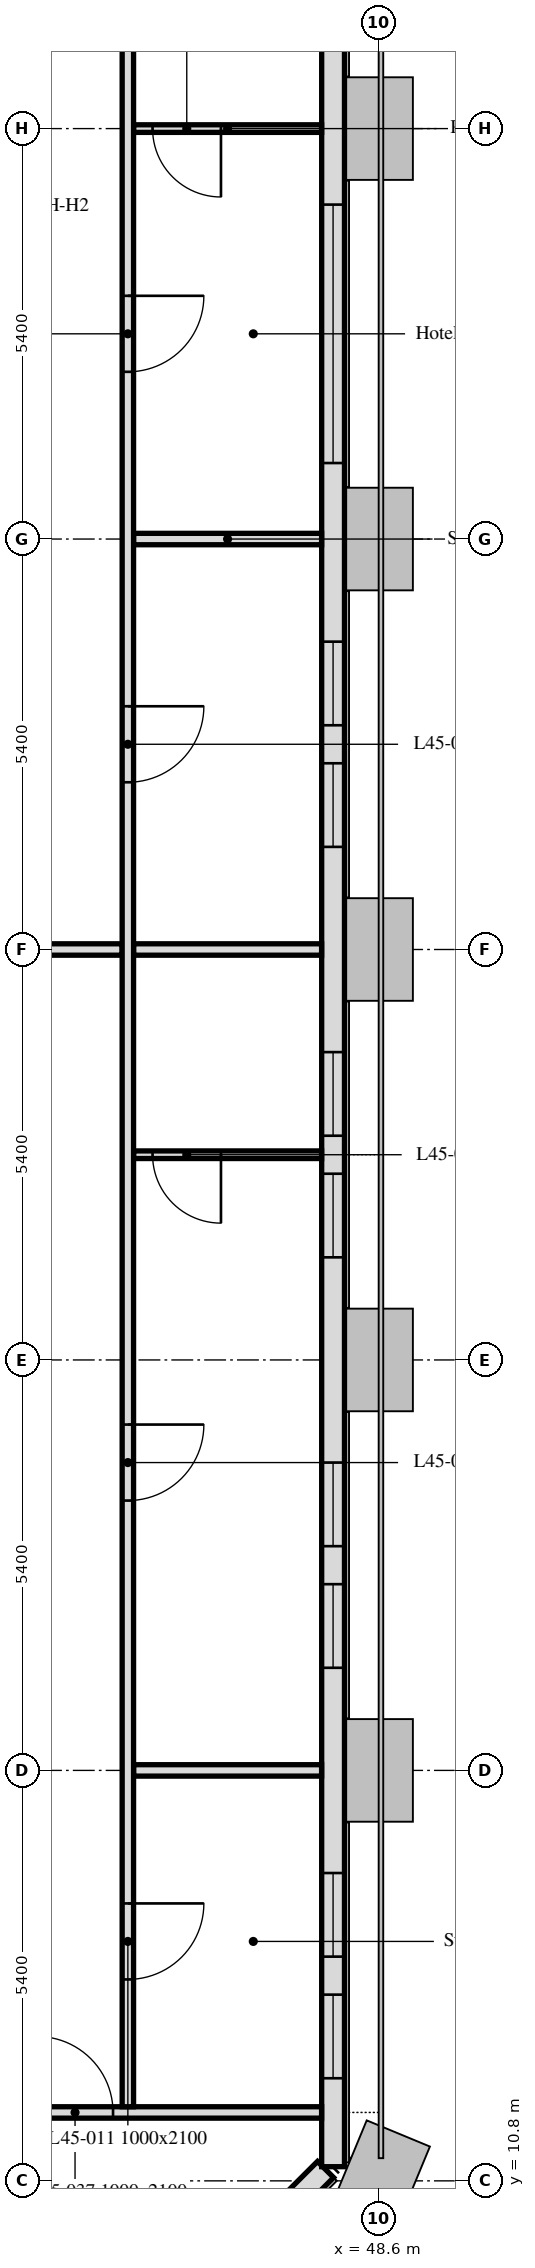
"""IFC4 building model, lengths in metres.
Left out: names, types, materials, properties, quantities, classifications, styles, units other than length and angle.
Written with IfcOpenShell. Run it as: python <this file> out.ifc"""

import sys

from ifc_helpers import new_model, si_unit, direction, frame, frame_2d, origin, place, context, subcontext, project, spatial, rectangle, extrude, element, fill, save


model = new_model("IFC4")
c1 = context("Model", 3, precision=1e-05, world=origin(), true_north=direction((0.0, 1.0)))
c2 = subcontext(c1, "Body", "Model", "MODEL_VIEW")
j1 = project(units=[si_unit("LENGTHUNIT", "METRE"), si_unit("PLANEANGLEUNIT", "RADIAN")], contexts=[c1])
p1 = place(None, origin())
s1 = spatial("IfcSite", under=j1, at=p1, CompositionType="ELEMENT")
p2 = place(p1, origin())
s2 = spatial("IfcBuilding", under=s1, at=p2, CompositionType="ELEMENT")
p3 = place(p2, frame((0.0, 0.0, 187.3)))
s3 = spatial("IfcBuildingStorey", under=s2, at=p3, CompositionType="ELEMENT", Elevation=187.3)
p4 = place(p3, frame((43.051, 6.099, 0.0), z_axis=(0.0, 0.0, 1.0), x_axis=(0.707106781187, 0.707106781187, 0.0)))
e1 = element("IfcWall", 1, at=p4, inside=s3, PredefinedType="SOLIDWALL", context=c2, shape_type="SweptSolid", body=[
    extrude(rectangle(XDim=6.86, YDim=0.3, at=frame_2d((3.43, 0.0))), origin(), (0.0, 0.0, 1.0), 3.0),
])
p5 = place(p4, frame((1.73, 0.0, 0.9)))
e2 = element("IfcOpeningElement", 2, at=p5, cuts=e1, PredefinedType="OPENING", context=c2, shape_type="SweptSolid", body=[
    extrude(rectangle(XDim=3.4, YDim=1.7, at=frame_2d((1.7, 0.85))), frame((0.0, 0.16, 0.0), z_axis=(0.0, -1.0, 0.0), x_axis=(1.0, 0.0, 0.0)), (0.0, 0.0, 1.0), 0.32),
])
p6 = place(p3, frame((48.0, 10.986, 0.0), z_axis=(0.0, 0.0, 1.0), x_axis=(0.0, 1.0, 0.0)))
e3 = element("IfcWall", 3, at=p6, inside=s3, PredefinedType="SOLIDWALL", context=c2, shape_type="SweptSolid", body=[
    extrude(rectangle(XDim=32.027, YDim=0.3, at=frame_2d((16.014, 0.0))), origin(), (0.0, 0.0, 1.0), 3.0),
])
p7 = place(p6, frame((1.164, 0.0, 0.9)))
e4 = element("IfcOpeningElement", 4, at=p7, cuts=e3, PredefinedType="OPENING", context=c2, shape_type="SweptSolid", body=[
    extrude(rectangle(XDim=1.1, YDim=1.7, at=frame_2d((0.55, 0.85))), frame((0.0, 0.16, 0.0), z_axis=(0.0, -1.0, 0.0), x_axis=(1.0, 0.0, 0.0)), (0.0, 0.0, 1.0), 0.32),
])
p8 = place(p6, frame((2.764, 0.0, 0.9)))
e5 = element("IfcOpeningElement", 5, at=p8, cuts=e3, PredefinedType="OPENING", context=c2, shape_type="SweptSolid", body=[
    extrude(rectangle(XDim=1.1, YDim=1.7, at=frame_2d((0.55, 0.85))), frame((0.0, 0.16, 0.0), z_axis=(0.0, -1.0, 0.0), x_axis=(1.0, 0.0, 0.0)), (0.0, 0.0, 1.0), 0.32),
])
p9 = place(p6, frame((6.564, 0.0, 0.9)))
e6 = element("IfcOpeningElement", 6, at=p9, cuts=e3, PredefinedType="OPENING", context=c2, shape_type="SweptSolid", body=[
    extrude(rectangle(XDim=1.1, YDim=1.7, at=frame_2d((0.55, 0.85))), frame((0.0, 0.16, 0.0), z_axis=(0.0, -1.0, 0.0), x_axis=(1.0, 0.0, 0.0)), (0.0, 0.0, 1.0), 0.32),
])
p10 = place(p6, frame((8.164, 0.0, 0.9)))
e7 = element("IfcOpeningElement", 7, at=p10, cuts=e3, PredefinedType="OPENING", context=c2, shape_type="SweptSolid", body=[
    extrude(rectangle(XDim=1.1, YDim=1.7, at=frame_2d((0.55, 0.85))), frame((0.0, 0.16, 0.0), z_axis=(0.0, -1.0, 0.0), x_axis=(1.0, 0.0, 0.0)), (0.0, 0.0, 1.0), 0.32),
])
p11 = place(p6, frame((11.964, 0.0, 0.9)))
e8 = element("IfcOpeningElement", 8, at=p11, cuts=e3, PredefinedType="OPENING", context=c2, shape_type="SweptSolid", body=[
    extrude(rectangle(XDim=1.1, YDim=1.7, at=frame_2d((0.55, 0.85))), frame((0.0, 0.16, 0.0), z_axis=(0.0, -1.0, 0.0), x_axis=(1.0, 0.0, 0.0)), (0.0, 0.0, 1.0), 0.32),
])
p12 = place(p6, frame((13.564, 0.0, 0.9)))
e9 = element("IfcOpeningElement", 9, at=p12, cuts=e3, PredefinedType="OPENING", context=c2, shape_type="SweptSolid", body=[
    extrude(rectangle(XDim=1.1, YDim=1.7, at=frame_2d((0.55, 0.85))), frame((0.0, 0.16, 0.0), z_axis=(0.0, -1.0, 0.0), x_axis=(1.0, 0.0, 0.0)), (0.0, 0.0, 1.0), 0.32),
])
p13 = place(p6, frame((17.364, 0.0, 0.9)))
e10 = element("IfcOpeningElement", 10, at=p13, cuts=e3, PredefinedType="OPENING", context=c2, shape_type="SweptSolid", body=[
    extrude(rectangle(XDim=1.1, YDim=1.7, at=frame_2d((0.55, 0.85))), frame((0.0, 0.16, 0.0), z_axis=(0.0, -1.0, 0.0), x_axis=(1.0, 0.0, 0.0)), (0.0, 0.0, 1.0), 0.32),
])
p14 = place(p6, frame((18.964, 0.0, 0.9)))
e11 = element("IfcOpeningElement", 11, at=p14, cuts=e3, PredefinedType="OPENING", context=c2, shape_type="SweptSolid", body=[
    extrude(rectangle(XDim=1.1, YDim=1.7, at=frame_2d((0.55, 0.85))), frame((0.0, 0.16, 0.0), z_axis=(0.0, -1.0, 0.0), x_axis=(1.0, 0.0, 0.0)), (0.0, 0.0, 1.0), 0.32),
])
p15 = place(p6, frame((22.414, 0.0, 0.9)))
e12 = element("IfcOpeningElement", 12, at=p15, cuts=e3, PredefinedType="OPENING", context=c2, shape_type="SweptSolid", body=[
    extrude(rectangle(XDim=3.4, YDim=1.7, at=frame_2d((1.7, 0.85))), frame((0.0, 0.16, 0.0), z_axis=(0.0, -1.0, 0.0), x_axis=(1.0, 0.0, 0.0)), (0.0, 0.0, 1.0), 0.32),
])
p16 = place(p6, frame((28.164, 0.0, 0.9)))
e13 = element("IfcOpeningElement", 13, at=p16, cuts=e3, PredefinedType="OPENING", context=c2, shape_type="SweptSolid", body=[
    extrude(rectangle(XDim=1.1, YDim=1.7, at=frame_2d((0.55, 0.85))), frame((0.0, 0.16, 0.0), z_axis=(0.0, -1.0, 0.0), x_axis=(1.0, 0.0, 0.0)), (0.0, 0.0, 1.0), 0.32),
])
p17 = place(p6, frame((29.764, 0.0, 0.9)))
e14 = element("IfcOpeningElement", 14, at=p17, cuts=e3, PredefinedType="OPENING", context=c2, shape_type="SweptSolid", body=[
    extrude(rectangle(XDim=1.1, YDim=1.7, at=frame_2d((0.55, 0.85))), frame((0.0, 0.16, 0.0), z_axis=(0.0, -1.0, 0.0), x_axis=(1.0, 0.0, 0.0)), (0.0, 0.0, 1.0), 0.32),
])
p18 = place(p3, frame((45.375, 32.4, 0.0), z_axis=(0.0, 0.0, 1.0), x_axis=(1.0, 0.0, 0.0)))
e15 = element("IfcWall", 15, at=p18, inside=s3, PredefinedType="PARTITIONING", context=c2, shape_type="SweptSolid", body=[
    extrude(rectangle(XDim=2.474, YDim=0.15, at=frame_2d((1.237, 0.0))), origin(), (0.0, 0.0, 1.0), 2.4),
])
p19 = place(p3, frame((47.849, 37.8, 0.0), z_axis=(0.0, 0.0, 1.0), x_axis=(-1.0, 0.0, 0.0)))
e16 = element("IfcWall", 16, at=p19, inside=s3, PredefinedType="PARTITIONING", context=c2, shape_type="SweptSolid", body=[
    extrude(rectangle(XDim=2.474, YDim=0.1, at=frame_2d((1.237, 0.0))), origin(), (0.0, 0.0, 1.0), 2.4),
])
p20 = place(p19, frame((1.324, 0.0, 0.0)))
e17 = element("IfcOpeningElement", 17, at=p20, cuts=e16, PredefinedType="OPENING", context=c2, shape_type="SweptSolid", body=[
    extrude(rectangle(XDim=0.9, YDim=2.1, at=frame_2d((0.45, 1.05))), frame((0.0, 0.05, 0.0), z_axis=(0.0, -1.0, 0.0), x_axis=(1.0, 0.0, 0.0)), (0.0, 0.0, 1.0), 0.1),
])
p21 = place(p3, frame((45.375, 27.0, 0.0), z_axis=(0.0, 0.0, 1.0), x_axis=(1.0, 0.0, 0.0)))
e18 = element("IfcWall", 18, at=p21, inside=s3, PredefinedType="PARTITIONING", context=c2, shape_type="SweptSolid", body=[
    extrude(rectangle(XDim=2.474, YDim=0.15, at=frame_2d((1.237, 0.0))), origin(), (0.0, 0.0, 1.0), 2.4),
])
p22 = place(p3, frame((43.2, 27.0, 0.0), z_axis=(0.0, 0.0, 1.0), x_axis=(1.0, 0.0, 0.0)))
e19 = element("IfcWall", 19, at=p22, inside=s3, PredefinedType="PARTITIONING", context=c2, shape_type="SweptSolid", body=[
    extrude(rectangle(XDim=2.025, YDim=0.15, at=frame_2d((1.013, 0.0))), origin(), (0.0, 0.0, 1.0), 2.4),
])
p23 = place(p3, frame((47.849, 16.2, 0.0), z_axis=(0.0, 0.0, 1.0), x_axis=(-1.0, 0.0, 0.0)))
e20 = element("IfcWall", 20, at=p23, inside=s3, PredefinedType="PARTITIONING", context=c2, shape_type="SweptSolid", body=[
    extrude(rectangle(XDim=2.474, YDim=0.15, at=frame_2d((1.237, 0.0))), origin(), (0.0, 0.0, 1.0), 2.4),
])
p24 = place(p3, frame((6.151, 11.7, 0.0), z_axis=(0.0, 0.0, 1.0), x_axis=(1.0, 0.0, 0.0)))
e21 = element("IfcWall", 21, at=p24, inside=s3, PredefinedType="PARTITIONING", context=c2, shape_type="SweptSolid", body=[
    extrude(rectangle(XDim=41.698, YDim=0.15, at=frame_2d((20.849, 0.0))), origin(), (0.0, 0.0, 1.0), 3.0),
])
p25 = place(p24, frame((1.449, 0.0, 0.0)))
e22 = element("IfcOpeningElement", 22, at=p25, cuts=e21, PredefinedType="OPENING", context=c2, shape_type="SweptSolid", body=[
    extrude(rectangle(XDim=1.0, YDim=2.1, at=frame_2d((0.5, 1.05))), frame((0.0, 0.075, 0.0), z_axis=(0.0, -1.0, 0.0), x_axis=(1.0, 0.0, 0.0)), (0.0, 0.0, 1.0), 0.15),
])
p26 = place(p24, frame((37.954, 0.0, 0.0)))
e23 = element("IfcOpeningElement", 23, at=p26, cuts=e21, PredefinedType="OPENING", context=c2, shape_type="SweptSolid", body=[
    extrude(rectangle(XDim=1.0, YDim=2.1, at=frame_2d((0.5, 1.05))), frame((0.0, 0.075, 0.0), z_axis=(0.0, -1.0, 0.0), x_axis=(1.0, 0.0, 0.0)), (0.0, 0.0, 1.0), 0.15),
])
p27 = place(p24, frame((12.449, 0.0, 0.0)))
e24 = element("IfcOpeningElement", 24, at=p27, cuts=e21, PredefinedType="OPENING", context=c2, shape_type="SweptSolid", body=[
    extrude(rectangle(XDim=1.0, YDim=2.1, at=frame_2d((0.5, 1.05))), frame((0.0, 0.075, 0.0), z_axis=(0.0, -1.0, 0.0), x_axis=(1.0, 0.0, 0.0)), (0.0, 0.0, 1.0), 0.15),
])
p28 = place(p24, frame((23.249, 0.0, 0.0)))
e25 = element("IfcOpeningElement", 25, at=p28, cuts=e21, PredefinedType="OPENING", context=c2, shape_type="SweptSolid", body=[
    extrude(rectangle(XDim=1.0, YDim=2.1, at=frame_2d((0.5, 1.05))), frame((0.0, 0.075, 0.0), z_axis=(0.0, -1.0, 0.0), x_axis=(1.0, 0.0, 0.0)), (0.0, 0.0, 1.0), 0.15),
])
p29 = place(p3, frame((47.849, 24.3, 0.0), z_axis=(0.0, 0.0, 1.0), x_axis=(-1.0, 0.0, 0.0)))
e26 = element("IfcWall", 26, at=p29, inside=s3, PredefinedType="PARTITIONING", context=c2, shape_type="SweptSolid", body=[
    extrude(rectangle(XDim=2.474, YDim=0.1, at=frame_2d((1.237, 0.0))), origin(), (0.0, 0.0, 1.0), 3.0),
])
p30 = place(p29, frame((1.324, 0.0, 0.0)))
e27 = element("IfcOpeningElement", 27, at=p30, cuts=e26, PredefinedType="OPENING", context=c2, shape_type="SweptSolid", body=[
    extrude(rectangle(XDim=0.9, YDim=2.1, at=frame_2d((0.45, 1.05))), frame((0.0, 0.05, 0.0), z_axis=(0.0, -1.0, 0.0), x_axis=(1.0, 0.0, 0.0)), (0.0, 0.0, 1.0), 0.1),
])
p31 = place(p3, frame((45.3, 40.425, 0.0), z_axis=(0.0, 0.0, 1.0), x_axis=(0.0, -1.0, 0.0)))
e28 = element("IfcWall", 28, at=p31, inside=s3, PredefinedType="PARTITIONING", context=c2, shape_type="SweptSolid", body=[
    extrude(rectangle(XDim=28.65, YDim=0.15, at=frame_2d((14.325, 0.0))), origin(), (0.0, 0.0, 1.0), 2.4),
])
p32 = place(p31, frame((10.225, 0.0, 0.0)))
e29 = element("IfcOpeningElement", 29, at=p32, cuts=e28, PredefinedType="OPENING", context=c2, shape_type="SweptSolid", body=[
    extrude(rectangle(XDim=1.0, YDim=2.1, at=frame_2d((0.5, 1.05))), frame((0.0, 0.075, 0.0), z_axis=(0.0, -1.0, 0.0), x_axis=(1.0, 0.0, 0.0)), (0.0, 0.0, 1.0), 0.15),
])
p33 = place(p31, frame((25.975, 0.0, 0.0)))
e30 = element("IfcOpeningElement", 30, at=p33, cuts=e28, PredefinedType="OPENING", context=c2, shape_type="SweptSolid", body=[
    extrude(rectangle(XDim=1.0, YDim=2.1, at=frame_2d((0.5, 1.05))), frame((0.0, 0.075, 0.0), z_axis=(0.0, -1.0, 0.0), x_axis=(1.0, 0.0, 0.0)), (0.0, 0.0, 1.0), 0.15),
])
p34 = place(p31, frame((4.825, 0.0, 0.0)))
e31 = element("IfcOpeningElement", 31, at=p34, cuts=e28, PredefinedType="OPENING", context=c2, shape_type="SweptSolid", body=[
    extrude(rectangle(XDim=1.0, YDim=2.1, at=frame_2d((0.5, 1.05))), frame((0.0, 0.075, 0.0), z_axis=(0.0, -1.0, 0.0), x_axis=(1.0, 0.0, 0.0)), (0.0, 0.0, 1.0), 0.15),
])
p35 = place(p31, frame((19.675, 0.0, 0.0)))
e32 = element("IfcOpeningElement", 32, at=p35, cuts=e28, PredefinedType="OPENING", context=c2, shape_type="SweptSolid", body=[
    extrude(rectangle(XDim=1.0, YDim=2.1, at=frame_2d((0.5, 1.05))), frame((0.0, 0.075, 0.0), z_axis=(0.0, -1.0, 0.0), x_axis=(1.0, 0.0, 0.0)), (0.0, 0.0, 1.0), 0.15),
])
p36 = place(p7, origin())
e33 = element("IfcWindow", 33, at=p36, inside=s3, PartitioningType="SINGLE_PANEL", PredefinedType="WINDOW", context=c2, shape_type="SweptSolid", body=[
    extrude(rectangle(XDim=1.1, YDim=1.7, at=frame_2d((0.55, 0.85))), frame((0.0, 0.03, 0.0), z_axis=(0.0, -1.0, 0.0), x_axis=(1.0, 0.0, 0.0)), (0.0, 0.0, 1.0), 0.06),
])
fill(e4, e33)
p37 = place(p8, origin())
e34 = element("IfcWindow", 34, at=p37, inside=s3, PartitioningType="SINGLE_PANEL", PredefinedType="WINDOW", context=c2, shape_type="SweptSolid", body=[
    extrude(rectangle(XDim=1.1, YDim=1.7, at=frame_2d((0.55, 0.85))), frame((0.0, 0.03, 0.0), z_axis=(0.0, -1.0, 0.0), x_axis=(1.0, 0.0, 0.0)), (0.0, 0.0, 1.0), 0.06),
])
fill(e5, e34)
p38 = place(p9, origin())
e35 = element("IfcWindow", 35, at=p38, inside=s3, PartitioningType="SINGLE_PANEL", PredefinedType="WINDOW", context=c2, shape_type="SweptSolid", body=[
    extrude(rectangle(XDim=1.1, YDim=1.7, at=frame_2d((0.55, 0.85))), frame((0.0, 0.03, 0.0), z_axis=(0.0, -1.0, 0.0), x_axis=(1.0, 0.0, 0.0)), (0.0, 0.0, 1.0), 0.06),
])
fill(e6, e35)
p39 = place(p10, origin())
e36 = element("IfcWindow", 36, at=p39, inside=s3, PartitioningType="SINGLE_PANEL", PredefinedType="WINDOW", context=c2, shape_type="SweptSolid", body=[
    extrude(rectangle(XDim=1.1, YDim=1.7, at=frame_2d((0.55, 0.85))), frame((0.0, 0.03, 0.0), z_axis=(0.0, -1.0, 0.0), x_axis=(1.0, 0.0, 0.0)), (0.0, 0.0, 1.0), 0.06),
])
fill(e7, e36)
p40 = place(p11, origin())
e37 = element("IfcWindow", 37, at=p40, inside=s3, PartitioningType="SINGLE_PANEL", PredefinedType="WINDOW", context=c2, shape_type="SweptSolid", body=[
    extrude(rectangle(XDim=1.1, YDim=1.7, at=frame_2d((0.55, 0.85))), frame((0.0, 0.03, 0.0), z_axis=(0.0, -1.0, 0.0), x_axis=(1.0, 0.0, 0.0)), (0.0, 0.0, 1.0), 0.06),
])
fill(e8, e37)
p41 = place(p12, origin())
e38 = element("IfcWindow", 38, at=p41, inside=s3, PartitioningType="SINGLE_PANEL", PredefinedType="WINDOW", context=c2, shape_type="SweptSolid", body=[
    extrude(rectangle(XDim=1.1, YDim=1.7, at=frame_2d((0.55, 0.85))), frame((0.0, 0.03, 0.0), z_axis=(0.0, -1.0, 0.0), x_axis=(1.0, 0.0, 0.0)), (0.0, 0.0, 1.0), 0.06),
])
fill(e9, e38)
p42 = place(p13, origin())
e39 = element("IfcWindow", 39, at=p42, inside=s3, PartitioningType="SINGLE_PANEL", PredefinedType="WINDOW", context=c2, shape_type="SweptSolid", body=[
    extrude(rectangle(XDim=1.1, YDim=1.7, at=frame_2d((0.55, 0.85))), frame((0.0, 0.03, 0.0), z_axis=(0.0, -1.0, 0.0), x_axis=(1.0, 0.0, 0.0)), (0.0, 0.0, 1.0), 0.06),
])
fill(e10, e39)
p43 = place(p14, origin())
e40 = element("IfcWindow", 40, at=p43, inside=s3, PartitioningType="SINGLE_PANEL", PredefinedType="WINDOW", context=c2, shape_type="SweptSolid", body=[
    extrude(rectangle(XDim=1.1, YDim=1.7, at=frame_2d((0.55, 0.85))), frame((0.0, 0.03, 0.0), z_axis=(0.0, -1.0, 0.0), x_axis=(1.0, 0.0, 0.0)), (0.0, 0.0, 1.0), 0.06),
])
fill(e11, e40)
p44 = place(p15, origin())
e41 = element("IfcWindow", 41, at=p44, inside=s3, PartitioningType="SINGLE_PANEL", PredefinedType="WINDOW", context=c2, shape_type="SweptSolid", body=[
    extrude(rectangle(XDim=3.4, YDim=1.7, at=frame_2d((1.7, 0.85))), frame((0.0, 0.03, 0.0), z_axis=(0.0, -1.0, 0.0), x_axis=(1.0, 0.0, 0.0)), (0.0, 0.0, 1.0), 0.06),
])
fill(e12, e41)
p45 = place(p20, origin())
e42 = element("IfcDoor", 42, at=p45, inside=s3, OperationType="SINGLE_SWING_RIGHT", PredefinedType="DOOR", context=c2, shape_type="SweptSolid", body=[
    extrude(rectangle(XDim=0.9, YDim=2.1, at=frame_2d((0.45, 1.05))), frame((0.0, 0.025, 0.0), z_axis=(0.0, -1.0, 0.0), x_axis=(1.0, 0.0, 0.0)), (0.0, 0.0, 1.0), 0.05),
])
fill(e17, e42)
p46 = place(p32, origin())
e43 = element("IfcDoor", 43, at=p46, inside=s3, OperationType="SINGLE_SWING_RIGHT", PredefinedType="DOOR", context=c2, shape_type="SweptSolid", body=[
    extrude(rectangle(XDim=1.0, YDim=2.1, at=frame_2d((0.5, 1.05))), frame((0.0, 0.025, 0.0), z_axis=(0.0, -1.0, 0.0), x_axis=(1.0, 0.0, 0.0)), (0.0, 0.0, 1.0), 0.05),
])
fill(e29, e43)
p47 = place(p33, origin())
e44 = element("IfcDoor", 44, at=p47, inside=s3, OperationType="SINGLE_SWING_LEFT", PredefinedType="DOOR", context=c2, shape_type="SweptSolid", body=[
    extrude(rectangle(XDim=1.0, YDim=2.1, at=frame_2d((0.5, 1.05))), frame((0.0, 0.025, 0.0), z_axis=(0.0, -1.0, 0.0), x_axis=(1.0, 0.0, 0.0)), (0.0, 0.0, 1.0), 0.05),
])
fill(e30, e44)
p48 = place(p30, origin())
e45 = element("IfcDoor", 45, at=p48, inside=s3, OperationType="SINGLE_SWING_LEFT", PredefinedType="DOOR", context=c2, shape_type="SweptSolid", body=[
    extrude(rectangle(XDim=0.9, YDim=2.1, at=frame_2d((0.45, 1.05))), frame((0.0, 0.025, 0.0), z_axis=(0.0, -1.0, 0.0), x_axis=(1.0, 0.0, 0.0)), (0.0, 0.0, 1.0), 0.05),
])
fill(e27, e45)
p49 = place(p34, origin())
e46 = element("IfcDoor", 46, at=p49, inside=s3, OperationType="SINGLE_SWING_RIGHT", PredefinedType="DOOR", context=c2, shape_type="SweptSolid", body=[
    extrude(rectangle(XDim=1.0, YDim=2.1, at=frame_2d((0.5, 1.05))), frame((0.0, 0.025, 0.0), z_axis=(0.0, -1.0, 0.0), x_axis=(1.0, 0.0, 0.0)), (0.0, 0.0, 1.0), 0.05),
])
fill(e31, e46)
p50 = place(p26, origin())
e47 = element("IfcDoor", 47, at=p50, inside=s3, OperationType="SINGLE_SWING_LEFT", PredefinedType="DOOR", context=c2, shape_type="SweptSolid", body=[
    extrude(rectangle(XDim=1.0, YDim=2.1, at=frame_2d((0.5, 1.05))), frame((0.0, 0.025, 0.0), z_axis=(0.0, -1.0, 0.0), x_axis=(1.0, 0.0, 0.0)), (0.0, 0.0, 1.0), 0.05),
])
fill(e23, e47)
p51 = place(p35, origin())
e48 = element("IfcDoor", 48, at=p51, inside=s3, OperationType="SINGLE_SWING_RIGHT", PredefinedType="DOOR", context=c2, shape_type="SweptSolid", body=[
    extrude(rectangle(XDim=1.0, YDim=2.1, at=frame_2d((0.5, 1.05))), frame((0.0, 0.025, 0.0), z_axis=(0.0, -1.0, 0.0), x_axis=(1.0, 0.0, 0.0)), (0.0, 0.0, 1.0), 0.05),
])
fill(e32, e48)
save(model, sys.argv[1])
